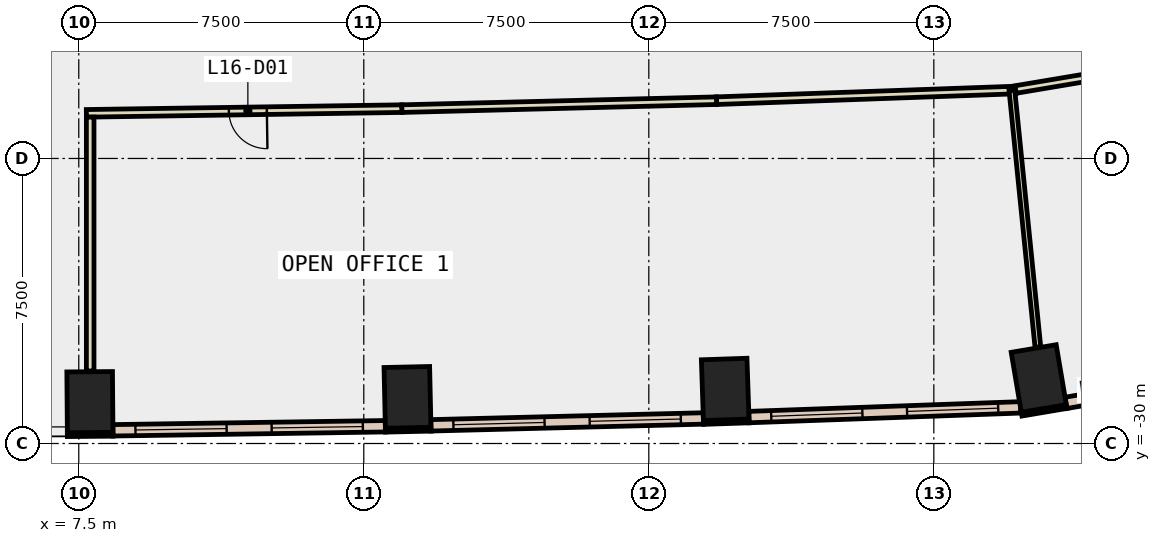
"""IFC4 building model, lengths in metres.
Left out: names, types, materials, properties, quantities, classifications, styles, units other than length and angle.
Written with IfcOpenShell. Run it as: python <this file> out.ifc"""

import sys

from ifc_helpers import new_model, si_unit, direction, frame, frame_2d, origin, origin_2d, place, context, subcontext, project, spatial, rectangle, extrude, element, fill, save


model = new_model("IFC4")
c1 = context("Model", 3, precision=1e-05, world=origin(), true_north=direction((0.0, 1.0)))
c2 = subcontext(c1, "Body", "Model", "MODEL_VIEW")
j1 = project(units=[si_unit("LENGTHUNIT", "METRE"), si_unit("PLANEANGLEUNIT", "RADIAN")], contexts=[c1])
p1 = place(None, origin())
s1 = spatial("IfcSite", under=j1, at=p1, CompositionType="ELEMENT")
p2 = place(p1, origin())
s2 = spatial("IfcBuilding", under=s1, at=p2, CompositionType="ELEMENT")
p3 = place(p2, frame((0.0, 0.0, 77.0)))
s3 = spatial("IfcBuildingStorey", under=s2, at=p3, CompositionType="ELEMENT", Elevation=77.0)
for number, where, z_axis, x_axis in (
    (1, (7.793, -28.912, -0.4), (0.0, 0.0, 1.0), (1.0, 0.008, 0.0)),
    (2, (16.15, -28.787, -0.4), (0.0, 0.0, 1.0), (1.0, 0.022, 0.0)),
    (3, (24.51, -28.577, -0.4), (0.0, 0.0, 1.0), (0.999, 0.034, 0.0)),
    (4, (32.761, -28.29, -0.4), (0.0, 0.0, 1.0), (0.986, 0.167, 0.0)),
):
    element("IfcColumn", number, at=place(p3, frame(where, z_axis=z_axis, x_axis=x_axis)), inside=s3, PredefinedType="COLUMN", context=c2, shape_type="SweptSolid", body=[
        extrude(rectangle(XDim=1.2, YDim=1.6, at=origin_2d()), origin(), (0.0, 0.0, 1.0), 4.0),
    ])
p4 = place(p3, frame((7.2, -29.767, 0.0), z_axis=(0.0, 0.0, 1.0), x_axis=(0.999965208912, 0.008341520563, 0.0)))
e5 = element("IfcWall", 5, at=p4, inside=s3, PredefinedType="STANDARD", context=c2, shape_type="SweptSolid", body=[
    extrude(rectangle(XDim=1.2, YDim=0.1, at=frame_2d((0.6, 0.0))), origin(), (0.0, 0.0, 1.0), 3.6),
])
p5 = place(p3, frame((15.569, -29.65, 0.0), z_axis=(0.0, 0.0, 1.0), x_axis=(0.99976752127, 0.021561618973, 0.0)))
e6 = element("IfcWall", 6, at=p5, inside=s3, PredefinedType="STANDARD", context=c2, shape_type="SweptSolid", body=[
    extrude(rectangle(XDim=1.2, YDim=0.1, at=frame_2d((0.6, 0.0))), origin(), (0.0, 0.0, 1.0), 3.6),
])
for number, where, z_axis, x_axis in (
    (7, (23.939, -29.446, 0.0), (0.0, 0.0, 1.0), (0.999, 0.033, 0.0)),
    (8, (32.311, -29.228, 0.0), (0.0, 0.0, 1.0), (0.986, 0.167, 0.0)),
):
    element("IfcWall", number, at=place(p3, frame(where, z_axis=z_axis, x_axis=x_axis)), inside=s3, PredefinedType="STANDARD", context=c2, shape_type="SweptSolid", body=[
        extrude(rectangle(XDim=1.2, YDim=0.1, at=frame_2d((0.6, 0.0))), origin(), (0.0, 0.0, 1.0), 3.6),
    ])
p6 = place(p3, frame((8.398, -29.653, 0.0), z_axis=(0.0, 0.0, 1.0), x_axis=(0.999888301342, 0.014946064363, 0.0)))
e9 = element("IfcWall", 9, at=p6, inside=s3, PredefinedType="STANDARD", context=c2, shape_type="SweptSolid", body=[
    extrude(rectangle(XDim=7.171, YDim=0.3, at=frame_2d((3.585, 0.0))), origin(), (0.0, 0.0, 1.0), 3.6),
])
p7 = place(p6, frame((0.593, 0.0, 0.9)))
e10 = element("IfcOpeningElement", 10, at=p7, cuts=e9, PredefinedType="OPENING", context=c2, shape_type="SweptSolid", body=[
    extrude(rectangle(XDim=2.4, YDim=2.6, at=frame_2d((1.2, 1.3))), frame((0.0, 0.16, 0.0), z_axis=(0.0, -1.0, 0.0), x_axis=(1.0, 0.0, 0.0)), (0.0, 0.0, 1.0), 0.32),
])
p8 = place(p6, frame((4.178, 0.0, 0.9)))
e11 = element("IfcOpeningElement", 11, at=p8, cuts=e9, PredefinedType="OPENING", context=c2, shape_type="SweptSolid", body=[
    extrude(rectangle(XDim=2.4, YDim=2.6, at=frame_2d((1.2, 1.3))), frame((0.0, 0.16, 0.0), z_axis=(0.0, -1.0, 0.0), x_axis=(1.0, 0.0, 0.0)), (0.0, 0.0, 1.0), 0.32),
])
p9 = place(p3, frame((16.765, -29.522, 0.0), z_axis=(0.0, 0.0, 1.0), x_axis=(0.999681944744, 0.025219225856, 0.0)))
e12 = element("IfcWall", 12, at=p9, inside=s3, PredefinedType="STANDARD", context=c2, shape_type="SweptSolid", body=[
    extrude(rectangle(XDim=7.173, YDim=0.3, at=frame_2d((3.587, 0.0))), origin(), (0.0, 0.0, 1.0), 3.6),
])
p10 = place(p9, frame((0.593, 0.0, 0.9)))
e13 = element("IfcOpeningElement", 13, at=p10, cuts=e12, PredefinedType="OPENING", context=c2, shape_type="SweptSolid", body=[
    extrude(rectangle(XDim=2.4, YDim=2.6, at=frame_2d((1.2, 1.3))), frame((0.0, 0.16, 0.0), z_axis=(0.0, -1.0, 0.0), x_axis=(1.0, 0.0, 0.0)), (0.0, 0.0, 1.0), 0.32),
])
p11 = place(p9, frame((4.18, 0.0, 0.9)))
e14 = element("IfcOpeningElement", 14, at=p11, cuts=e12, PredefinedType="OPENING", context=c2, shape_type="SweptSolid", body=[
    extrude(rectangle(XDim=2.4, YDim=2.6, at=frame_2d((1.2, 1.3))), frame((0.0, 0.16, 0.0), z_axis=(0.0, -1.0, 0.0), x_axis=(1.0, 0.0, 0.0)), (0.0, 0.0, 1.0), 0.32),
])
p12 = place(p3, frame((25.134, -29.305, 0.0), z_axis=(0.0, 0.0, 1.0), x_axis=(0.999359981296, 0.035771885388, 0.0)))
e15 = element("IfcWall", 15, at=p12, inside=s3, PredefinedType="STANDARD", context=c2, shape_type="SweptSolid", body=[
    extrude(rectangle(XDim=7.153, YDim=0.3, at=frame_2d((3.576, 0.0))), origin(), (0.0, 0.0, 1.0), 3.6),
])
p13 = place(p12, frame((0.588, 0.0, 0.9)))
e16 = element("IfcOpeningElement", 16, at=p13, cuts=e15, PredefinedType="OPENING", context=c2, shape_type="SweptSolid", body=[
    extrude(rectangle(XDim=2.4, YDim=2.6, at=frame_2d((1.2, 1.3))), frame((0.0, 0.16, 0.0), z_axis=(0.0, -1.0, 0.0), x_axis=(1.0, 0.0, 0.0)), (0.0, 0.0, 1.0), 0.32),
])
p14 = place(p12, frame((4.164, 0.0, 0.9)))
e17 = element("IfcOpeningElement", 17, at=p14, cuts=e15, PredefinedType="OPENING", context=c2, shape_type="SweptSolid", body=[
    extrude(rectangle(XDim=2.4, YDim=2.6, at=frame_2d((1.2, 1.3))), frame((0.0, 0.16, 0.0), z_axis=(0.0, -1.0, 0.0), x_axis=(1.0, 0.0, 0.0)), (0.0, 0.0, 1.0), 0.32),
])
p15 = place(p3, frame((33.477, -28.93, 0.0), z_axis=(0.0, 0.0, 1.0), x_axis=(0.986295041399, 0.164991185557, 0.0)))
e18 = element("IfcWall", 18, at=p15, inside=s3, PredefinedType="STANDARD", context=c2, shape_type="SweptSolid", body=[
    extrude(rectangle(XDim=4.145, YDim=0.3, at=frame_2d((2.072, 0.0))), origin(), (0.0, 0.0, 1.0), 3.6),
])
p16 = place(p15, frame((1.372, 0.0, 0.9)))
e19 = element("IfcOpeningElement", 19, at=p16, cuts=e18, PredefinedType="OPENING", context=c2, shape_type="SweptSolid", body=[
    extrude(rectangle(XDim=1.4, YDim=2.6, at=frame_2d((0.7, 1.3))), frame((0.0, 0.16, 0.0), z_axis=(0.0, -1.0, 0.0), x_axis=(1.0, 0.0, 0.0)), (0.0, 0.0, 1.0), 0.32),
])
p17 = place(p3, frame((32.154, -20.699, 0.0), z_axis=(0.0, 0.0, 1.0), x_axis=(-0.999363643656, -0.035669423029, 0.0)))
e20 = element("IfcWall", 20, at=p17, inside=s3, PredefinedType="PARTITIONING", context=c2, shape_type="SweptSolid", body=[
    extrude(rectangle(XDim=7.878, YDim=0.2, at=frame_2d((3.939, 0.0))), origin(), (0.0, 0.0, 1.0), 3.6),
])
p18 = place(p3, frame((24.281, -20.98, 0.0), z_axis=(0.0, 0.0, 1.0), x_axis=(-0.999681784235, -0.025225587575, 0.0)))
e21 = element("IfcWall", 21, at=p18, inside=s3, PredefinedType="PARTITIONING", context=c2, shape_type="SweptSolid", body=[
    extrude(rectangle(XDim=8.285, YDim=0.2, at=frame_2d((4.142, 0.0))), origin(), (0.0, 0.0, 1.0), 3.6),
])
p19 = place(p3, frame((15.999, -21.189, 0.0), z_axis=(0.0, 0.0, 1.0), x_axis=(-0.999888353348, -0.014942584753, 0.0)))
e22 = element("IfcWall", 22, at=p19, inside=s3, PredefinedType="PARTITIONING", context=c2, shape_type="SweptSolid", body=[
    extrude(rectangle(XDim=8.3, YDim=0.2, at=frame_2d((4.15, 0.0))), origin(), (0.0, 0.0, 1.0), 3.6),
])
p20 = place(p19, frame((3.55, 0.0, 0.0)))
e23 = element("IfcOpeningElement", 23, at=p20, cuts=e22, PredefinedType="OPENING", context=c2, shape_type="SweptSolid", body=[
    extrude(rectangle(XDim=1.0, YDim=2.1, at=frame_2d((0.5, 1.05))), frame((0.0, 0.11, 0.0), z_axis=(0.0, -1.0, 0.0), x_axis=(1.0, 0.0, 0.0)), (0.0, 0.0, 1.0), 0.22),
])
p21 = place(p3, frame((34.518, -20.289, 0.0), z_axis=(0.0, 0.0, 1.0), x_axis=(-0.986214562432, -0.165471559025, 0.0)))
e24 = element("IfcWall", 24, at=p21, inside=s3, PredefinedType="PARTITIONING", context=c2, shape_type="SweptSolid", body=[
    extrude(rectangle(XDim=2.399, YDim=0.2, at=frame_2d((1.199, 0.0))), origin(), (0.0, 0.0, 1.0), 3.6),
])
p22 = place(p3, frame((7.8, -21.411, 0.0), z_axis=(0.0, 0.0, 1.0), x_axis=(0.0, -1.0, 0.0)))
e25 = element("IfcWall", 25, at=p22, inside=s3, PredefinedType="PARTITIONING", context=c2, shape_type="SweptSolid", body=[
    extrude(rectangle(XDim=6.681, YDim=0.2, at=frame_2d((3.341, 0.0))), origin(), (0.0, 0.0, 1.0), 3.6),
])
p23 = place(p3, frame((32.054, -20.702, 0.0), z_axis=(0.0, 0.0, 1.0), x_axis=(0.100681219953, -0.994918736354, 0.0)))
e26 = element("IfcWall", 26, at=p23, inside=s3, PredefinedType="PARTITIONING", context=c2, shape_type="SweptSolid", body=[
    extrude(rectangle(XDim=6.794, YDim=0.15, at=frame_2d((3.397, 0.0))), origin(), (0.0, 0.0, 1.0), 3.6),
])
p24 = place(p7, origin())
e27 = element("IfcWindow", 27, at=p24, inside=s3, PartitioningType="SINGLE_PANEL", PredefinedType="WINDOW", context=c2, shape_type="SweptSolid", body=[
    extrude(rectangle(XDim=2.4, YDim=2.6, at=frame_2d((1.2, 1.3))), frame((0.0, 0.03, 0.0), z_axis=(0.0, -1.0, 0.0), x_axis=(1.0, 0.0, 0.0)), (0.0, 0.0, 1.0), 0.06),
])
fill(e10, e27)
p25 = place(p8, origin())
e28 = element("IfcWindow", 28, at=p25, inside=s3, PartitioningType="SINGLE_PANEL", PredefinedType="WINDOW", context=c2, shape_type="SweptSolid", body=[
    extrude(rectangle(XDim=2.4, YDim=2.6, at=frame_2d((1.2, 1.3))), frame((0.0, 0.03, 0.0), z_axis=(0.0, -1.0, 0.0), x_axis=(1.0, 0.0, 0.0)), (0.0, 0.0, 1.0), 0.06),
])
fill(e11, e28)
p26 = place(p10, origin())
e29 = element("IfcWindow", 29, at=p26, inside=s3, PartitioningType="SINGLE_PANEL", PredefinedType="WINDOW", context=c2, shape_type="SweptSolid", body=[
    extrude(rectangle(XDim=2.4, YDim=2.6, at=frame_2d((1.2, 1.3))), frame((0.0, 0.03, 0.0), z_axis=(0.0, -1.0, 0.0), x_axis=(1.0, 0.0, 0.0)), (0.0, 0.0, 1.0), 0.06),
])
fill(e13, e29)
p27 = place(p11, origin())
e30 = element("IfcWindow", 30, at=p27, inside=s3, PartitioningType="SINGLE_PANEL", PredefinedType="WINDOW", context=c2, shape_type="SweptSolid", body=[
    extrude(rectangle(XDim=2.4, YDim=2.6, at=frame_2d((1.2, 1.3))), frame((0.0, 0.03, 0.0), z_axis=(0.0, -1.0, 0.0), x_axis=(1.0, 0.0, 0.0)), (0.0, 0.0, 1.0), 0.06),
])
fill(e14, e30)
p28 = place(p13, origin())
e31 = element("IfcWindow", 31, at=p28, inside=s3, PartitioningType="SINGLE_PANEL", PredefinedType="WINDOW", context=c2, shape_type="SweptSolid", body=[
    extrude(rectangle(XDim=2.4, YDim=2.6, at=frame_2d((1.2, 1.3))), frame((0.0, 0.03, 0.0), z_axis=(0.0, -1.0, 0.0), x_axis=(1.0, 0.0, 0.0)), (0.0, 0.0, 1.0), 0.06),
])
fill(e16, e31)
p29 = place(p14, origin())
e32 = element("IfcWindow", 32, at=p29, inside=s3, PartitioningType="SINGLE_PANEL", PredefinedType="WINDOW", context=c2, shape_type="SweptSolid", body=[
    extrude(rectangle(XDim=2.4, YDim=2.6, at=frame_2d((1.2, 1.3))), frame((0.0, 0.03, 0.0), z_axis=(0.0, -1.0, 0.0), x_axis=(1.0, 0.0, 0.0)), (0.0, 0.0, 1.0), 0.06),
])
fill(e17, e32)
p30 = place(p20, origin())
e33 = element("IfcDoor", 33, at=p30, inside=s3, OperationType="SINGLE_SWING_LEFT", PredefinedType="DOOR", context=c2, shape_type="SweptSolid", body=[
    extrude(rectangle(XDim=1.0, YDim=2.1, at=frame_2d((0.5, 1.05))), frame((0.0, 0.025, 0.0), z_axis=(0.0, -1.0, 0.0), x_axis=(1.0, 0.0, 0.0)), (0.0, 0.0, 1.0), 0.05),
])
fill(e23, e33)
save(model, sys.argv[1])
